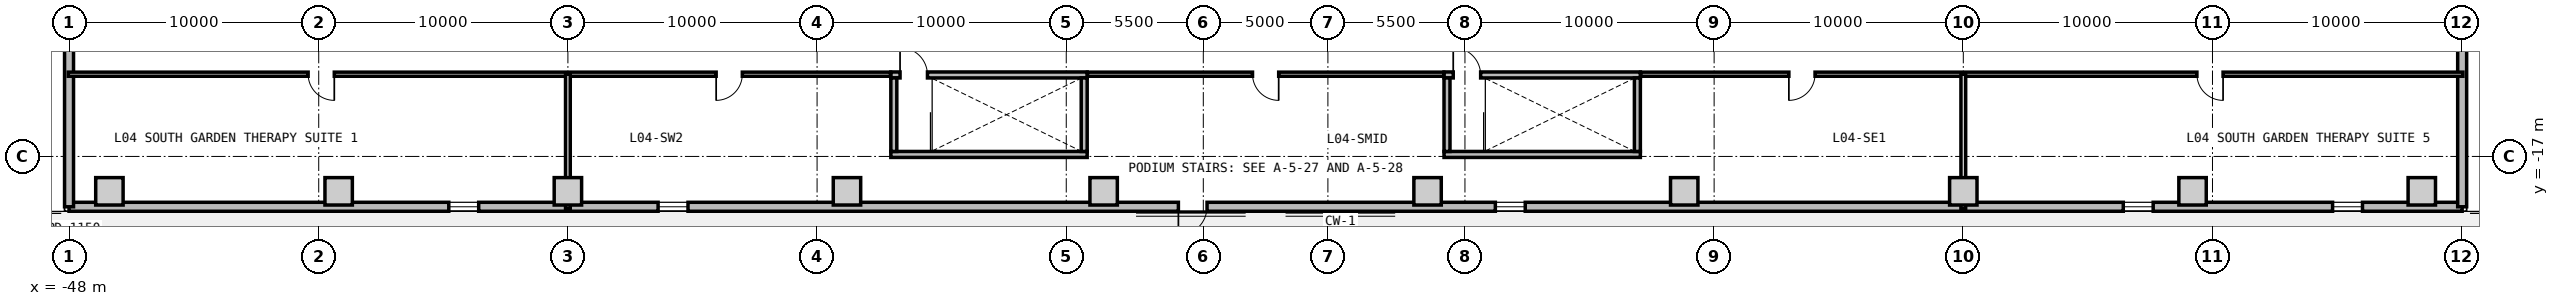
"""IFC4 building model, lengths in metres.
Left out: names, types, materials, properties, quantities, classifications, styles, units other than length and angle.
Written with IfcOpenShell. Run it as: python <this file> out.ifc"""

import sys

from ifc_helpers import new_model, si_unit, direction, frame, frame_2d, origin, origin_2d, place, context, subcontext, project, spatial, rectangle, extrude, source, transform, mapped, element, fill, save


model = new_model("IFC4")
c1 = context("Model", 3, precision=1e-05, world=origin(), true_north=direction((0.0, 1.0)))
c2 = subcontext(c1, "Body", "Model", "MODEL_VIEW")
j1 = project(units=[si_unit("LENGTHUNIT", "METRE"), si_unit("PLANEANGLEUNIT", "RADIAN")], contexts=[c1])
p1 = place(None, origin())
s1 = spatial("IfcSite", under=j1, at=p1, CompositionType="ELEMENT")
p2 = place(p1, origin())
s2 = spatial("IfcBuilding", under=s1, at=p2, CompositionType="ELEMENT")
p3 = place(p2, frame((0.0, 0.0, 16.8)))
s3 = spatial("IfcBuildingStorey", under=s2, at=p3, CompositionType="ELEMENT", Elevation=16.8)
m1 = source(origin(), c2, "Body", "SweptSolid", [
    extrude(rectangle(XDim=1.1, YDim=1.1, at=origin_2d()), origin(), (0.0, 0.0, 1.0), 4.38),
])
for number, where, z_axis, x_axis in (
    (1, (-46.4, -18.4, 0.0), (0.0, 0.0, 1.0), (1.0, 0.0, 0.0)),
    (2, (-37.2, -18.4, 0.0), (0.0, 0.0, 1.0), (1.0, 0.0, 0.0)),
    (3, (-28.0, -18.4, 0.0), (0.0, 0.0, 1.0), (1.0, 0.0, 0.0)),
    (4, (-16.8, -18.4, 0.0), (0.0, 0.0, 1.0), (1.0, 0.0, 0.0)),
    (5, (-6.5, -18.4, 0.0), (0.0, 0.0, 1.0), (1.0, 0.0, 0.0)),
    (6, (6.5, -18.4, 0.0), (0.0, 0.0, 1.0), (1.0, 0.0, 0.0)),
    (7, (16.8, -18.4, 0.0), (0.0, 0.0, 1.0), (1.0, 0.0, 0.0)),
    (8, (28.0, -18.4, 0.0), (0.0, 0.0, 1.0), (1.0, 0.0, 0.0)),
    (9, (37.2, -18.4, 0.0), (0.0, 0.0, 1.0), (1.0, 0.0, 0.0)),
    (10, (46.4, -18.4, 0.0), (0.0, 0.0, 1.0), (1.0, 0.0, 0.0)),
):
    element("IfcColumn", number, at=place(p3, frame(where, z_axis=z_axis, x_axis=x_axis)), inside=s3, PredefinedType="COLUMN", context=c2, shape_type="MappedRepresentation", body=[
        mapped(m1, transform((0.0, 0.0, 0.0), x_axis=(1.0, 0.0, 0.0), y_axis=(0.0, 1.0, 0.0), z_axis=(0.0, 0.0, 1.0), scale=1.0)),
    ])
m2 = source(origin(), c2, "Body", "SweptSolid", [
    extrude(rectangle(XDim=96.04, YDim=0.36, at=frame_2d((48.02, 0.0))), origin(), (0.0, 0.0, 1.0), 4.38),
])
p4 = place(p3, frame((48.02, -19.02, 0.0), z_axis=(0.0, 0.0, 1.0), x_axis=(-1.0, 0.0, 0.0)))
e11 = element("IfcWall", 11, at=p4, inside=s3, PredefinedType="SOLIDWALL", context=c2, shape_type="MappedRepresentation", body=[
    mapped(m2, transform((0.0, 0.0, 0.0), x_axis=(1.0, 0.0, 0.0), y_axis=(0.0, 1.0, 0.0), z_axis=(0.0, 0.0, 1.0), scale=1.0)),
])
p5 = place(p4, frame((50.37, 0.0, 0.0)))
e12 = element("IfcOpeningElement", 12, at=p5, cuts=e11, PredefinedType="OPENING", context=c2, shape_type="SweptSolid", body=[
    extrude(rectangle(XDim=1.15, YDim=2.25, at=frame_2d((0.575, 1.125))), frame((0.0, 0.19, 0.0), z_axis=(0.0, -1.0, 0.0), x_axis=(1.0, 0.0, 0.0)), (0.0, 0.0, 1.0), 0.38),
])
p6 = place(p4, frame((4.0, 0.0, 0.85)))
e13 = element("IfcOpeningElement", 13, at=p6, cuts=e11, PredefinedType="OPENING", context=c2, shape_type="SweptSolid", body=[
    extrude(rectangle(XDim=1.2, YDim=1.5, at=frame_2d((0.6, 0.75))), frame((0.0, 0.19, 0.0), z_axis=(0.0, -1.0, 0.0), x_axis=(1.0, 0.0, 0.0)), (0.0, 0.0, 1.0), 0.38),
])
p7 = place(p4, frame((12.4, 0.0, 0.85)))
e14 = element("IfcOpeningElement", 14, at=p7, cuts=e11, PredefinedType="OPENING", context=c2, shape_type="SweptSolid", body=[
    extrude(rectangle(XDim=1.2, YDim=1.5, at=frame_2d((0.6, 0.75))), frame((0.0, 0.19, 0.0), z_axis=(0.0, -1.0, 0.0), x_axis=(1.0, 0.0, 0.0)), (0.0, 0.0, 1.0), 0.38),
])
p8 = place(p4, frame((37.6, 0.0, 0.85)))
e15 = element("IfcOpeningElement", 15, at=p8, cuts=e11, PredefinedType="OPENING", context=c2, shape_type="SweptSolid", body=[
    extrude(rectangle(XDim=1.2, YDim=1.5, at=frame_2d((0.6, 0.75))), frame((0.0, 0.19, 0.0), z_axis=(0.0, -1.0, 0.0), x_axis=(1.0, 0.0, 0.0)), (0.0, 0.0, 1.0), 0.38),
])
p9 = place(p4, frame((71.2, 0.0, 0.85)))
e16 = element("IfcOpeningElement", 16, at=p9, cuts=e11, PredefinedType="OPENING", context=c2, shape_type="SweptSolid", body=[
    extrude(rectangle(XDim=1.2, YDim=1.5, at=frame_2d((0.6, 0.75))), frame((0.0, 0.19, 0.0), z_axis=(0.0, -1.0, 0.0), x_axis=(1.0, 0.0, 0.0)), (0.0, 0.0, 1.0), 0.38),
])
p10 = place(p4, frame((79.6, 0.0, 0.85)))
e17 = element("IfcOpeningElement", 17, at=p10, cuts=e11, PredefinedType="OPENING", context=c2, shape_type="SweptSolid", body=[
    extrude(rectangle(XDim=1.2, YDim=1.5, at=frame_2d((0.6, 0.75))), frame((0.0, 0.19, 0.0), z_axis=(0.0, -1.0, 0.0), x_axis=(1.0, 0.0, 0.0)), (0.0, 0.0, 1.0), 0.38),
])
m3 = source(origin(), c2, "Body", "SweptSolid", [
    extrude(rectangle(XDim=38.04, YDim=0.36, at=frame_2d((19.02, 0.0))), origin(), (0.0, 0.0, 1.0), 4.38),
])
p11 = place(p3, frame((-48.02, -19.02, 0.0), z_axis=(0.0, 0.0, 1.0), x_axis=(0.0, 1.0, 0.0)))
e18 = element("IfcWall", 18, at=p11, inside=s3, PredefinedType="SOLIDWALL", context=c2, shape_type="MappedRepresentation", body=[
    mapped(m3, transform((0.0, 0.0, 0.0), x_axis=(1.0, 0.0, 0.0), y_axis=(0.0, 1.0, 0.0), z_axis=(0.0, 0.0, 1.0), scale=1.0)),
])
p12 = place(p11, frame((12.4, 0.0, 0.85)))
e19 = element("IfcOpeningElement", 19, at=p12, cuts=e18, PredefinedType="OPENING", context=c2, shape_type="SweptSolid", body=[
    extrude(rectangle(XDim=1.2, YDim=1.5, at=frame_2d((0.6, 0.75))), frame((0.0, 0.19, 0.0), z_axis=(0.0, -1.0, 0.0), x_axis=(1.0, 0.0, 0.0)), (0.0, 0.0, 1.0), 0.38),
])
p13 = place(p11, frame((20.8, 0.0, 0.85)))
e20 = element("IfcOpeningElement", 20, at=p13, cuts=e18, PredefinedType="OPENING", context=c2, shape_type="SweptSolid", body=[
    extrude(rectangle(XDim=1.2, YDim=1.5, at=frame_2d((0.6, 0.75))), frame((0.0, 0.19, 0.0), z_axis=(0.0, -1.0, 0.0), x_axis=(1.0, 0.0, 0.0)), (0.0, 0.0, 1.0), 0.38),
])
p14 = place(p3, frame((48.02, 19.02, 0.0), z_axis=(0.0, 0.0, 1.0), x_axis=(0.0, -1.0, 0.0)))
e21 = element("IfcWall", 21, at=p14, inside=s3, PredefinedType="SOLIDWALL", context=c2, shape_type="MappedRepresentation", body=[
    mapped(m3, transform((0.0, 0.0, 0.0), x_axis=(1.0, 0.0, 0.0), y_axis=(0.0, 1.0, 0.0), z_axis=(0.0, 0.0, 1.0), scale=1.0)),
])
p15 = place(p14, frame((4.0, 0.0, 0.85)))
e22 = element("IfcOpeningElement", 22, at=p15, cuts=e21, PredefinedType="OPENING", context=c2, shape_type="SweptSolid", body=[
    extrude(rectangle(XDim=1.2, YDim=1.5, at=frame_2d((0.6, 0.75))), frame((0.0, 0.19, 0.0), z_axis=(0.0, -1.0, 0.0), x_axis=(1.0, 0.0, 0.0)), (0.0, 0.0, 1.0), 0.38),
])
p16 = place(p14, frame((12.4, 0.0, 0.85)))
e23 = element("IfcOpeningElement", 23, at=p16, cuts=e21, PredefinedType="OPENING", context=c2, shape_type="SweptSolid", body=[
    extrude(rectangle(XDim=1.2, YDim=1.5, at=frame_2d((0.6, 0.75))), frame((0.0, 0.19, 0.0), z_axis=(0.0, -1.0, 0.0), x_axis=(1.0, 0.0, 0.0)), (0.0, 0.0, 1.0), 0.38),
])
p17 = place(p14, frame((20.8, 0.0, 0.85)))
e24 = element("IfcOpeningElement", 24, at=p17, cuts=e21, PredefinedType="OPENING", context=c2, shape_type="SweptSolid", body=[
    extrude(rectangle(XDim=1.2, YDim=1.5, at=frame_2d((0.6, 0.75))), frame((0.0, 0.19, 0.0), z_axis=(0.0, -1.0, 0.0), x_axis=(1.0, 0.0, 0.0)), (0.0, 0.0, 1.0), 0.38),
])
m4 = source(origin(), c2, "Body", "SweptSolid", [
    extrude(rectangle(XDim=7.88, YDim=0.24, at=frame_2d((3.94, 0.0))), origin(), (0.0, 0.0, 1.0), 4.38),
])
p18 = place(p3, frame((-15.04, -13.73, 0.0), z_axis=(0.0, 0.0, 1.0), x_axis=(1.0, 0.0, 0.0)))
e25 = element("IfcWall", 25, at=p18, inside=s3, PredefinedType="PARTITIONING", context=c2, shape_type="MappedRepresentation", body=[
    mapped(m4, transform((0.0, 0.0, 0.0), x_axis=(1.0, 0.0, 0.0), y_axis=(0.0, 1.0, 0.0), z_axis=(0.0, 0.0, 1.0), scale=1.0)),
])
p19 = place(p18, frame((0.37, 0.0, 0.0)))
e26 = element("IfcOpeningElement", 26, at=p19, cuts=e25, PredefinedType="OPENING", context=c2, shape_type="SweptSolid", body=[
    extrude(rectangle(XDim=1.1, YDim=2.15, at=frame_2d((0.55, 1.075))), frame((0.0, 0.13, 0.0), z_axis=(0.0, -1.0, 0.0), x_axis=(1.0, 0.0, 0.0)), (0.0, 0.0, 1.0), 0.26),
])
p20 = place(p3, frame((-15.04, -16.92, 0.0), z_axis=(0.0, 0.0, 1.0), x_axis=(1.0, 0.0, 0.0)))
e27 = element("IfcWall", 27, at=p20, inside=s3, PredefinedType="PARTITIONING", context=c2, shape_type="MappedRepresentation", body=[
    mapped(m4, transform((0.0, 0.0, 0.0), x_axis=(1.0, 0.0, 0.0), y_axis=(0.0, 1.0, 0.0), z_axis=(0.0, 0.0, 1.0), scale=1.0)),
])
m5 = source(origin(), c2, "Body", "SweptSolid", [
    extrude(rectangle(XDim=2.95, YDim=0.24, at=frame_2d((1.475, 0.0))), origin(), (0.0, 0.0, 1.0), 4.38),
])
for number, where, z_axis, x_axis in (
    (28, (-14.92, -16.8, 0.0), (0.0, 0.0, 1.0), (0.0, 1.0, 0.0)),
    (29, (-7.28, -16.8, 0.0), (0.0, 0.0, 1.0), (0.0, 1.0, 0.0)),
):
    element("IfcWall", number, at=place(p3, frame(where, z_axis=z_axis, x_axis=x_axis)), inside=s3, PredefinedType="PARTITIONING", context=c2, shape_type="MappedRepresentation", body=[
        mapped(m5, transform((0.0, 0.0, 0.0), x_axis=(1.0, 0.0, 0.0), y_axis=(0.0, 1.0, 0.0), z_axis=(0.0, 0.0, 1.0), scale=1.0)),
    ])
p21 = place(p3, frame((7.16, -13.73, 0.0), z_axis=(0.0, 0.0, 1.0), x_axis=(1.0, 0.0, 0.0)))
e30 = element("IfcWall", 30, at=p21, inside=s3, PredefinedType="PARTITIONING", context=c2, shape_type="MappedRepresentation", body=[
    mapped(m4, transform((0.0, 0.0, 0.0), x_axis=(1.0, 0.0, 0.0), y_axis=(0.0, 1.0, 0.0), z_axis=(0.0, 0.0, 1.0), scale=1.0)),
])
p22 = place(p21, frame((0.37, 0.0, 0.0)))
e31 = element("IfcOpeningElement", 31, at=p22, cuts=e30, PredefinedType="OPENING", context=c2, shape_type="SweptSolid", body=[
    extrude(rectangle(XDim=1.1, YDim=2.15, at=frame_2d((0.55, 1.075))), frame((0.0, 0.13, 0.0), z_axis=(0.0, -1.0, 0.0), x_axis=(1.0, 0.0, 0.0)), (0.0, 0.0, 1.0), 0.26),
])
p23 = place(p3, frame((7.16, -16.92, 0.0), z_axis=(0.0, 0.0, 1.0), x_axis=(1.0, 0.0, 0.0)))
e32 = element("IfcWall", 32, at=p23, inside=s3, PredefinedType="PARTITIONING", context=c2, shape_type="MappedRepresentation", body=[
    mapped(m4, transform((0.0, 0.0, 0.0), x_axis=(1.0, 0.0, 0.0), y_axis=(0.0, 1.0, 0.0), z_axis=(0.0, 0.0, 1.0), scale=1.0)),
])
for number, where, z_axis, x_axis in (
    (33, (7.28, -16.8, 0.0), (0.0, 0.0, 1.0), (0.0, 1.0, 0.0)),
    (34, (14.92, -16.8, 0.0), (0.0, 0.0, 1.0), (0.0, 1.0, 0.0)),
):
    element("IfcWall", number, at=place(p3, frame(where, z_axis=z_axis, x_axis=x_axis)), inside=s3, PredefinedType="PARTITIONING", context=c2, shape_type="MappedRepresentation", body=[
        mapped(m5, transform((0.0, 0.0, 0.0), x_axis=(1.0, 0.0, 0.0), y_axis=(0.0, 1.0, 0.0), z_axis=(0.0, 0.0, 1.0), scale=1.0)),
    ])
m6 = source(origin(), c2, "Body", "SweptSolid", [
    extrude(rectangle(XDim=33.0, YDim=0.165, at=frame_2d((16.5, 0.0))), origin(), (0.0, 0.0, 1.0), 4.365),
])
p24 = place(p3, frame((-48.05, -13.7, 0.0), z_axis=(0.0, 0.0, 1.0), x_axis=(1.0, 0.0, 0.0)))
e35 = element("IfcWall", 35, at=p24, inside=s3, PredefinedType="PARTITIONING", context=c2, shape_type="MappedRepresentation", body=[
    mapped(m6, transform((0.0, 0.0, 0.0), x_axis=(1.0, 0.0, 0.0), y_axis=(0.0, 1.0, 0.0), z_axis=(0.0, 0.0, 1.0), scale=1.0)),
])
p25 = place(p24, frame((9.625, 0.0, 0.0)))
e36 = element("IfcOpeningElement", 36, at=p25, cuts=e35, PredefinedType="OPENING", context=c2, shape_type="SweptSolid", body=[
    extrude(rectangle(XDim=1.05, YDim=2.15, at=frame_2d((0.525, 1.075))), frame((0.0, 0.093, 0.0), z_axis=(0.0, -1.0, 0.0), x_axis=(1.0, 0.0, 0.0)), (0.0, 0.0, 1.0), 0.185),
])
p26 = place(p24, frame((26.0, 0.0, 0.0)))
e37 = element("IfcOpeningElement", 37, at=p26, cuts=e35, PredefinedType="OPENING", context=c2, shape_type="SweptSolid", body=[
    extrude(rectangle(XDim=1.05, YDim=2.15, at=frame_2d((0.525, 1.075))), frame((0.0, 0.093, 0.0), z_axis=(0.0, -1.0, 0.0), x_axis=(1.0, 0.0, 0.0)), (0.0, 0.0, 1.0), 0.185),
])
m7 = source(origin(), c2, "Body", "SweptSolid", [
    extrude(rectangle(XDim=14.3, YDim=0.165, at=frame_2d((7.15, 0.0))), origin(), (0.0, 0.0, 1.0), 4.365),
])
p27 = place(p3, frame((-7.15, -13.7, 0.0), z_axis=(0.0, 0.0, 1.0), x_axis=(1.0, 0.0, 0.0)))
e38 = element("IfcWall", 38, at=p27, inside=s3, PredefinedType="PARTITIONING", context=c2, shape_type="MappedRepresentation", body=[
    mapped(m7, transform((0.0, 0.0, 0.0), x_axis=(1.0, 0.0, 0.0), y_axis=(0.0, 1.0, 0.0), z_axis=(0.0, 0.0, 1.0), scale=1.0)),
])
p28 = place(p27, frame((6.625, 0.0, 0.0)))
e39 = element("IfcOpeningElement", 39, at=p28, cuts=e38, PredefinedType="OPENING", context=c2, shape_type="SweptSolid", body=[
    extrude(rectangle(XDim=1.05, YDim=2.15, at=frame_2d((0.525, 1.075))), frame((0.0, 0.093, 0.0), z_axis=(0.0, -1.0, 0.0), x_axis=(1.0, 0.0, 0.0)), (0.0, 0.0, 1.0), 0.185),
])
p29 = place(p3, frame((15.05, -13.7, 0.0), z_axis=(0.0, 0.0, 1.0), x_axis=(1.0, 0.0, 0.0)))
e40 = element("IfcWall", 40, at=p29, inside=s3, PredefinedType="PARTITIONING", context=c2, shape_type="MappedRepresentation", body=[
    mapped(m6, transform((0.0, 0.0, 0.0), x_axis=(1.0, 0.0, 0.0), y_axis=(0.0, 1.0, 0.0), z_axis=(0.0, 0.0, 1.0), scale=1.0)),
])
p30 = place(p29, frame((5.95, 0.0, 0.0)))
e41 = element("IfcOpeningElement", 41, at=p30, cuts=e40, PredefinedType="OPENING", context=c2, shape_type="SweptSolid", body=[
    extrude(rectangle(XDim=1.05, YDim=2.15, at=frame_2d((0.525, 1.075))), frame((0.0, 0.093, 0.0), z_axis=(0.0, -1.0, 0.0), x_axis=(1.0, 0.0, 0.0)), (0.0, 0.0, 1.0), 0.185),
])
p31 = place(p29, frame((22.325, 0.0, 0.0)))
e42 = element("IfcOpeningElement", 42, at=p31, cuts=e40, PredefinedType="OPENING", context=c2, shape_type="SweptSolid", body=[
    extrude(rectangle(XDim=1.05, YDim=2.15, at=frame_2d((0.525, 1.075))), frame((0.0, 0.093, 0.0), z_axis=(0.0, -1.0, 0.0), x_axis=(1.0, 0.0, 0.0)), (0.0, 0.0, 1.0), 0.185),
])
m8 = source(origin(), c2, "Body", "SweptSolid", [
    extrude(rectangle(XDim=5.4, YDim=0.19, at=frame_2d((2.7, 0.0))), origin(), (0.0, 0.0, 1.0), 4.365),
])
for number, where, z_axis, x_axis in (
    (43, (-28.0, -19.1, 0.0), (0.0, 0.0, 1.0), (0.0, 1.0, 0.0)),
    (44, (28.0, -19.1, 0.0), (0.0, 0.0, 1.0), (0.0, 1.0, 0.0)),
):
    element("IfcWall", number, at=place(p3, frame(where, z_axis=z_axis, x_axis=x_axis)), inside=s3, PredefinedType="PARTITIONING", context=c2, shape_type="MappedRepresentation", body=[
        mapped(m8, transform((0.0, 0.0, 0.0), x_axis=(1.0, 0.0, 0.0), y_axis=(0.0, 1.0, 0.0), z_axis=(0.0, 0.0, 1.0), scale=1.0)),
    ])
m9 = source(origin(), c2, "Body", "SweptSolid", [
    extrude(rectangle(XDim=1.15, YDim=2.25, at=frame_2d((0.575, 1.125))), frame((0.0, 0.025, 0.0), z_axis=(0.0, -1.0, 0.0), x_axis=(1.0, 0.0, 0.0)), (0.0, 0.0, 1.0), 0.05),
])
p32 = place(p5, origin())
e45 = element("IfcDoor", 45, at=p32, inside=s3, OperationType="SINGLE_SWING_RIGHT", PredefinedType="DOOR", context=c2, shape_type="MappedRepresentation", body=[
    mapped(m9, transform((0.0, 0.0, 0.0), x_axis=(1.0, 0.0, 0.0), y_axis=(0.0, 1.0, 0.0), z_axis=(0.0, 0.0, 1.0), scale=1.0)),
])
fill(e12, e45)
m10 = source(origin(), c2, "Body", "SweptSolid", [
    extrude(rectangle(XDim=1.2, YDim=1.5, at=frame_2d((0.6, 0.75))), frame((0.0, 0.03, 0.0), z_axis=(0.0, -1.0, 0.0), x_axis=(1.0, 0.0, 0.0)), (0.0, 0.0, 1.0), 0.06),
])
p33 = place(p6, origin())
e46 = element("IfcWindow", 46, at=p33, inside=s3, PartitioningType="SINGLE_PANEL", PredefinedType="WINDOW", context=c2, shape_type="MappedRepresentation", body=[
    mapped(m10, transform((0.0, 0.0, 0.0), x_axis=(1.0, 0.0, 0.0), y_axis=(0.0, 1.0, 0.0), z_axis=(0.0, 0.0, 1.0), scale=1.0)),
])
fill(e13, e46)
p34 = place(p7, origin())
e47 = element("IfcWindow", 47, at=p34, inside=s3, PartitioningType="SINGLE_PANEL", PredefinedType="WINDOW", context=c2, shape_type="MappedRepresentation", body=[
    mapped(m10, transform((0.0, 0.0, 0.0), x_axis=(1.0, 0.0, 0.0), y_axis=(0.0, 1.0, 0.0), z_axis=(0.0, 0.0, 1.0), scale=1.0)),
])
fill(e14, e47)
p35 = place(p8, origin())
e48 = element("IfcWindow", 48, at=p35, inside=s3, PartitioningType="SINGLE_PANEL", PredefinedType="WINDOW", context=c2, shape_type="MappedRepresentation", body=[
    mapped(m10, transform((0.0, 0.0, 0.0), x_axis=(1.0, 0.0, 0.0), y_axis=(0.0, 1.0, 0.0), z_axis=(0.0, 0.0, 1.0), scale=1.0)),
])
fill(e15, e48)
p36 = place(p9, origin())
e49 = element("IfcWindow", 49, at=p36, inside=s3, PartitioningType="SINGLE_PANEL", PredefinedType="WINDOW", context=c2, shape_type="MappedRepresentation", body=[
    mapped(m10, transform((0.0, 0.0, 0.0), x_axis=(1.0, 0.0, 0.0), y_axis=(0.0, 1.0, 0.0), z_axis=(0.0, 0.0, 1.0), scale=1.0)),
])
fill(e16, e49)
p37 = place(p10, origin())
e50 = element("IfcWindow", 50, at=p37, inside=s3, PartitioningType="SINGLE_PANEL", PredefinedType="WINDOW", context=c2, shape_type="MappedRepresentation", body=[
    mapped(m10, transform((0.0, 0.0, 0.0), x_axis=(1.0, 0.0, 0.0), y_axis=(0.0, 1.0, 0.0), z_axis=(0.0, 0.0, 1.0), scale=1.0)),
])
fill(e17, e50)
m11 = source(origin(), c2, "Body", "SweptSolid", [
    extrude(rectangle(XDim=1.1, YDim=2.15, at=frame_2d((0.55, 1.075))), frame((0.0, 0.025, 0.0), z_axis=(0.0, -1.0, 0.0), x_axis=(1.0, 0.0, 0.0)), (0.0, 0.0, 1.0), 0.05),
])
p38 = place(p19, origin())
e51 = element("IfcDoor", 51, at=p38, inside=s3, OperationType="SINGLE_SWING_LEFT", PredefinedType="DOOR", context=c2, shape_type="MappedRepresentation", body=[
    mapped(m11, transform((0.0, 0.0, 0.0), x_axis=(1.0, 0.0, 0.0), y_axis=(0.0, 1.0, 0.0), z_axis=(0.0, 0.0, 1.0), scale=1.0)),
])
fill(e26, e51)
p39 = place(p22, origin())
e52 = element("IfcDoor", 52, at=p39, inside=s3, OperationType="SINGLE_SWING_LEFT", PredefinedType="DOOR", context=c2, shape_type="MappedRepresentation", body=[
    mapped(m11, transform((0.0, 0.0, 0.0), x_axis=(1.0, 0.0, 0.0), y_axis=(0.0, 1.0, 0.0), z_axis=(0.0, 0.0, 1.0), scale=1.0)),
])
fill(e31, e52)
m12 = source(origin(), c2, "Body", "SweptSolid", [
    extrude(rectangle(XDim=1.05, YDim=2.15, at=frame_2d((0.525, 1.075))), frame((0.0, 0.025, 0.0), z_axis=(0.0, -1.0, 0.0), x_axis=(1.0, 0.0, 0.0)), (0.0, 0.0, 1.0), 0.05),
])
p40 = place(p25, frame((1.05, 0.0, 0.0), z_axis=(0.0, 0.0, 1.0), x_axis=(-1.0, 0.0, 0.0)))
e53 = element("IfcDoor", 53, at=p40, inside=s3, OperationType="SINGLE_SWING_LEFT", PredefinedType="DOOR", context=c2, shape_type="MappedRepresentation", body=[
    mapped(m12, transform((0.0, 0.0, 0.0), x_axis=(1.0, 0.0, 0.0), y_axis=(0.0, 1.0, 0.0), z_axis=(0.0, 0.0, 1.0), scale=1.0)),
])
fill(e36, e53)
p41 = place(p26, frame((1.05, 0.0, 0.0), z_axis=(0.0, 0.0, 1.0), x_axis=(-1.0, 0.0, 0.0)))
e54 = element("IfcDoor", 54, at=p41, inside=s3, OperationType="SINGLE_SWING_RIGHT", PredefinedType="DOOR", context=c2, shape_type="MappedRepresentation", body=[
    mapped(m12, transform((0.0, 0.0, 0.0), x_axis=(1.0, 0.0, 0.0), y_axis=(0.0, 1.0, 0.0), z_axis=(0.0, 0.0, 1.0), scale=1.0)),
])
fill(e37, e54)
p42 = place(p28, frame((1.05, 0.0, 0.0), z_axis=(0.0, 0.0, 1.0), x_axis=(-1.0, 0.0, 0.0)))
e55 = element("IfcDoor", 55, at=p42, inside=s3, OperationType="SINGLE_SWING_LEFT", PredefinedType="DOOR", context=c2, shape_type="MappedRepresentation", body=[
    mapped(m12, transform((0.0, 0.0, 0.0), x_axis=(1.0, 0.0, 0.0), y_axis=(0.0, 1.0, 0.0), z_axis=(0.0, 0.0, 1.0), scale=1.0)),
])
fill(e39, e55)
p43 = place(p30, frame((1.05, 0.0, 0.0), z_axis=(0.0, 0.0, 1.0), x_axis=(-1.0, 0.0, 0.0)))
e56 = element("IfcDoor", 56, at=p43, inside=s3, OperationType="SINGLE_SWING_RIGHT", PredefinedType="DOOR", context=c2, shape_type="MappedRepresentation", body=[
    mapped(m12, transform((0.0, 0.0, 0.0), x_axis=(1.0, 0.0, 0.0), y_axis=(0.0, 1.0, 0.0), z_axis=(0.0, 0.0, 1.0), scale=1.0)),
])
fill(e41, e56)
p44 = place(p31, frame((1.05, 0.0, 0.0), z_axis=(0.0, 0.0, 1.0), x_axis=(-1.0, 0.0, 0.0)))
e57 = element("IfcDoor", 57, at=p44, inside=s3, OperationType="SINGLE_SWING_LEFT", PredefinedType="DOOR", context=c2, shape_type="MappedRepresentation", body=[
    mapped(m12, transform((0.0, 0.0, 0.0), x_axis=(1.0, 0.0, 0.0), y_axis=(0.0, 1.0, 0.0), z_axis=(0.0, 0.0, 1.0), scale=1.0)),
])
fill(e42, e57)
save(model, sys.argv[1])
